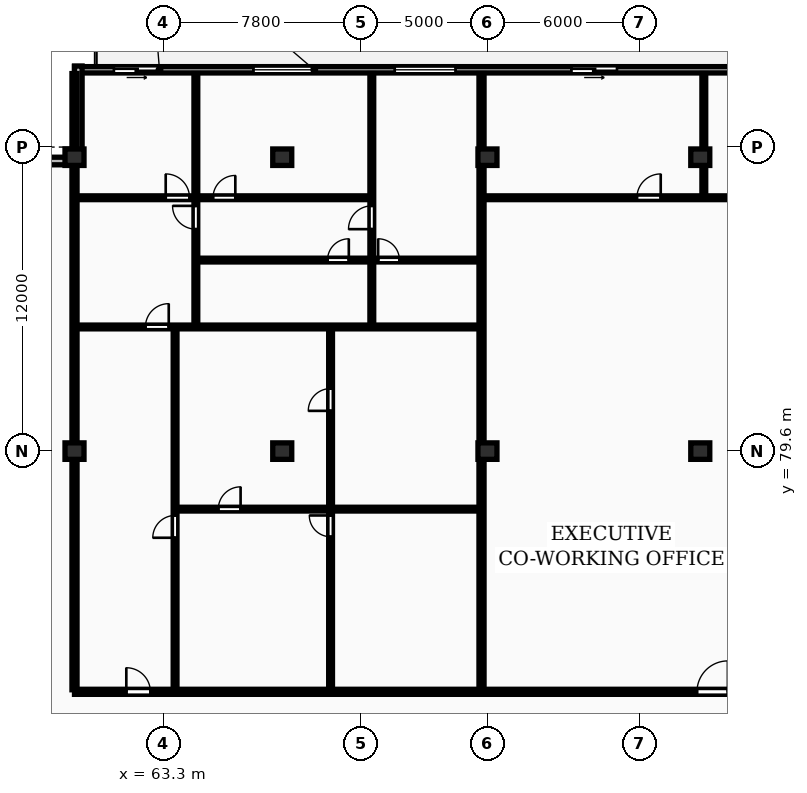
"""IFC4 building model, lengths in metres.
Left out: names, types, materials, properties, quantities, classifications, styles, units other than length and angle.
Written with IfcOpenShell. Run it as: python <this file> out.ifc"""

import sys

from ifc_helpers import new_model, si_unit, direction, frame, frame_2d, origin, origin_2d, place, context, subcontext, project, spatial, rectangle, extrude, element, fill, save


model = new_model("IFC4")
c1 = context("Model", 3, precision=1e-05, world=origin(), true_north=direction((0.0, 1.0)))
c2 = subcontext(c1, "Body", "Model", "MODEL_VIEW")
j1 = project(units=[si_unit("LENGTHUNIT", "METRE"), si_unit("PLANEANGLEUNIT", "RADIAN")], contexts=[c1])
p1 = place(None, origin())
s1 = spatial("IfcSite", under=j1, at=p1, CompositionType="ELEMENT")
p2 = place(p1, origin())
s2 = spatial("IfcBuilding", under=s1, at=p2, CompositionType="ELEMENT")
p3 = place(p2, frame((0.0, 0.0, 242.45)))
s3 = spatial("IfcBuildingStorey", under=s2, at=p3, CompositionType="ELEMENT", Elevation=242.45)
for number, where, z_axis, x_axis in (
    (1, (59.8, 79.6, 0.0), (0.0, 0.0, 1.0), (1.0, 0.0, 0.0)),
    (2, (59.8, 91.2, 0.0), (0.0, 0.0, 1.0), (1.0, 0.0, 0.0)),
    (3, (68.0, 79.6, 0.0), (0.0, 0.0, 1.0), (1.0, 0.0, 0.0)),
    (4, (68.0, 91.2, 0.0), (0.0, 0.0, 1.0), (1.0, 0.0, 0.0)),
    (5, (76.1, 79.6, 0.0), (0.0, 0.0, 1.0), (1.0, 0.0, 0.0)),
    (6, (76.1, 91.2, 0.0), (0.0, 0.0, 1.0), (1.0, 0.0, 0.0)),
    (7, (84.5, 79.6, 0.0), (0.0, 0.0, 1.0), (1.0, 0.0, 0.0)),
    (8, (84.5, 91.2, 0.0), (0.0, 0.0, 1.0), (1.0, 0.0, 0.0)),
):
    element("IfcColumn", number, at=place(p3, frame(where, z_axis=z_axis, x_axis=x_axis)), inside=s3, PredefinedType="COLUMN", context=c2, shape_type="SweptSolid", body=[
        extrude(rectangle(XDim=0.75, YDim=0.65, at=origin_2d()), origin(), (0.0, 0.0, 1.0), 3.45),
    ])
p4 = place(p3, frame((128.4, 94.65, 0.0), z_axis=(0.0, 0.0, 1.0), x_axis=(-1.0, 0.0, 0.0)))
e9 = element("IfcWall", 9, at=p4, inside=s3, PredefinedType="STANDARD", context=c2, shape_type="SweptSolid", body=[
    extrude(rectangle(XDim=68.6, YDim=0.25, at=frame_2d((34.3, 0.0))), origin(), (0.0, 0.0, 1.0), 3.17),
])
p5 = place(p4, frame((59.137, 0.0, 0.85)))
e10 = element("IfcOpeningElement", 10, at=p5, cuts=e9, PredefinedType="OPENING", context=c2, shape_type="SweptSolid", body=[
    extrude(rectangle(XDim=2.4, YDim=1.9, at=frame_2d((1.2, 0.95))), frame((0.0, 0.135, 0.0), z_axis=(0.0, -1.0, 0.0), x_axis=(1.0, 0.0, 0.0)), (0.0, 0.0, 1.0), 0.27),
])
p6 = place(p4, frame((65.245, 0.0, 0.0)))
e11 = element("IfcOpeningElement", 11, at=p6, cuts=e9, PredefinedType="OPENING", context=c2, shape_type="SweptSolid", body=[
    extrude(rectangle(XDim=1.8, YDim=2.2, at=frame_2d((0.9, 1.1))), frame((0.0, 0.135, 0.0), z_axis=(0.0, -1.0, 0.0), x_axis=(1.0, 0.0, 0.0)), (0.0, 0.0, 1.0), 0.27),
])
p7 = place(p4, frame((53.56, 0.0, 0.85)))
e12 = element("IfcOpeningElement", 12, at=p7, cuts=e9, PredefinedType="OPENING", context=c2, shape_type="SweptSolid", body=[
    extrude(rectangle(XDim=2.4, YDim=1.9, at=frame_2d((1.2, 0.95))), frame((0.0, 0.135, 0.0), z_axis=(0.0, -1.0, 0.0), x_axis=(1.0, 0.0, 0.0)), (0.0, 0.0, 1.0), 0.27),
])
p8 = place(p4, frame((47.188, 0.0, 0.0)))
e13 = element("IfcOpeningElement", 13, at=p8, cuts=e9, PredefinedType="OPENING", context=c2, shape_type="SweptSolid", body=[
    extrude(rectangle(XDim=1.8, YDim=2.2, at=frame_2d((0.9, 1.1))), frame((0.0, 0.135, 0.0), z_axis=(0.0, -1.0, 0.0), x_axis=(1.0, 0.0, 0.0)), (0.0, 0.0, 1.0), 0.27),
])
p9 = place(p4, frame((36.928, 0.0, 0.85)))
e14 = element("IfcOpeningElement", 14, at=p9, cuts=e9, PredefinedType="OPENING", context=c2, shape_type="SweptSolid", body=[
    extrude(rectangle(XDim=2.4, YDim=1.9, at=frame_2d((1.2, 0.95))), frame((0.0, 0.135, 0.0), z_axis=(0.0, -1.0, 0.0), x_axis=(1.0, 0.0, 0.0)), (0.0, 0.0, 1.0), 0.27),
])
p10 = place(p4, frame((27.64, 0.0, 0.0)))
e15 = element("IfcOpeningElement", 15, at=p10, cuts=e9, PredefinedType="OPENING", context=c2, shape_type="SweptSolid", body=[
    extrude(rectangle(XDim=1.8, YDim=2.2, at=frame_2d((0.9, 1.1))), frame((0.0, 0.135, 0.0), z_axis=(0.0, -1.0, 0.0), x_axis=(1.0, 0.0, 0.0)), (0.0, 0.0, 1.0), 0.27),
])
p11 = place(p4, frame((18.487, 0.0, 0.85)))
e16 = element("IfcOpeningElement", 16, at=p11, cuts=e9, PredefinedType="OPENING", context=c2, shape_type="SweptSolid", body=[
    extrude(rectangle(XDim=2.4, YDim=1.9, at=frame_2d((1.2, 0.95))), frame((0.0, 0.135, 0.0), z_axis=(0.0, -1.0, 0.0), x_axis=(1.0, 0.0, 0.0)), (0.0, 0.0, 1.0), 0.27),
])
p12 = place(p4, frame((7.966, 0.0, 0.0)))
e17 = element("IfcOpeningElement", 17, at=p12, cuts=e9, PredefinedType="OPENING", context=c2, shape_type="SweptSolid", body=[
    extrude(rectangle(XDim=1.8, YDim=2.2, at=frame_2d((0.9, 1.1))), frame((0.0, 0.135, 0.0), z_axis=(0.0, -1.0, 0.0), x_axis=(1.0, 0.0, 0.0)), (0.0, 0.0, 1.0), 0.27),
])
p13 = place(p4, frame((0.87, 0.0, 0.85)))
e18 = element("IfcOpeningElement", 18, at=p13, cuts=e9, PredefinedType="OPENING", context=c2, shape_type="SweptSolid", body=[
    extrude(rectangle(XDim=1.8, YDim=1.8, at=frame_2d((0.9, 0.9))), frame((0.0, 0.135, 0.0), z_axis=(0.0, -1.0, 0.0), x_axis=(1.0, 0.0, 0.0)), (0.0, 0.0, 1.0), 0.27),
])
for number, where, z_axis, x_axis in (
    (19, (59.95, 94.8, 0.0), (0.0, 0.0, 1.0), (0.0, -1.0, 0.0)),
    (20, (59.8, 91.05, 0.0), (0.0, 0.0, 1.0), (-1.0, 0.0, 0.0)),
):
    element("IfcWall", number, at=place(p3, frame(where, z_axis=z_axis, x_axis=x_axis)), inside=s3, PredefinedType="STANDARD", context=c2, shape_type="SweptSolid", body=[
        extrude(rectangle(XDim=3.6, YDim=0.3, at=frame_2d((1.8, 0.0))), origin(), (0.0, 0.0, 1.0), 3.17),
    ])
for number, where, z_axis, x_axis in (
    (21, (59.8, 70.18, 0.0), (0.0, 0.0, 1.0), (0.0, 1.0, 0.0)),
    (22, (75.865, 70.18, 0.0), (0.0, 0.0, 1.0), (0.0, 1.0, 0.0)),
):
    element("IfcWall", number, at=place(p3, frame(where, z_axis=z_axis, x_axis=x_axis)), inside=s3, PredefinedType="PARTITIONING", context=c2, shape_type="SweptSolid", body=[
        extrude(rectangle(XDim=24.32, YDim=0.2, at=frame_2d((12.16, 0.0))), origin(), (0.0, 0.0, 1.0), 2.477),
    ])
p14 = place(p3, frame((69.908, 70.16, 0.0), z_axis=(0.0, 0.0, 1.0), x_axis=(0.0, 1.0, 0.0)))
e23 = element("IfcWall", 23, at=p14, inside=s3, PredefinedType="PARTITIONING", context=c2, shape_type="SweptSolid", body=[
    extrude(rectangle(XDim=14.3, YDim=0.15, at=frame_2d((7.15, 0.0))), origin(), (0.0, 0.0, 1.0), 3.17),
])
p15 = place(p14, frame((6.06, 0.0, 0.0)))
e24 = element("IfcOpeningElement", 24, at=p15, cuts=e23, PredefinedType="OPENING", context=c2, shape_type="SweptSolid", body=[
    extrude(rectangle(XDim=0.84, YDim=2.04, at=frame_2d((0.42, 1.02))), frame((0.0, 0.085, 0.0), z_axis=(0.0, -1.0, 0.0), x_axis=(1.0, 0.0, 0.0)), (0.0, 0.0, 1.0), 0.17),
])
p16 = place(p14, frame((11.029, 0.0, 0.0)))
e25 = element("IfcOpeningElement", 25, at=p16, cuts=e23, PredefinedType="OPENING", context=c2, shape_type="SweptSolid", body=[
    extrude(rectangle(XDim=0.88, YDim=2.06, at=frame_2d((0.44, 1.03))), frame((0.0, 0.085, 0.0), z_axis=(0.0, -1.0, 0.0), x_axis=(1.0, 0.0, 0.0)), (0.0, 0.0, 1.0), 0.17),
])
p17 = place(p3, frame((63.83, 77.31, 0.0), z_axis=(0.0, 0.0, 1.0), x_axis=(1.0, 0.0, 0.0)))
e26 = element("IfcWall", 26, at=p17, inside=s3, PredefinedType="PARTITIONING", context=c2, shape_type="SweptSolid", body=[
    extrude(rectangle(XDim=11.955, YDim=0.15, at=frame_2d((5.978, 0.0))), origin(), (0.0, 0.0, 1.0), 3.17),
])
p18 = place(p17, frame((1.646, 0.0, 0.0)))
e27 = element("IfcOpeningElement", 27, at=p18, cuts=e26, PredefinedType="OPENING", context=c2, shape_type="SweptSolid", body=[
    extrude(rectangle(XDim=0.88, YDim=2.06, at=frame_2d((0.44, 1.03))), frame((0.0, 0.085, 0.0), z_axis=(0.0, -1.0, 0.0), x_axis=(1.0, 0.0, 0.0)), (0.0, 0.0, 1.0), 0.17),
])
p19 = place(p3, frame((63.77, 70.16, 0.0), z_axis=(0.0, 0.0, 1.0), x_axis=(0.0, 1.0, 0.0)))
e28 = element("IfcWall", 28, at=p19, inside=s3, PredefinedType="PARTITIONING", context=c2, shape_type="SweptSolid", body=[
    extrude(rectangle(XDim=14.3, YDim=0.15, at=frame_2d((7.15, 0.0))), origin(), (0.0, 0.0, 1.0), 3.17),
])
p20 = place(p19, frame((6.02, 0.0, 0.0)))
e29 = element("IfcOpeningElement", 29, at=p20, cuts=e28, PredefinedType="OPENING", context=c2, shape_type="SweptSolid", body=[
    extrude(rectangle(XDim=0.88, YDim=2.06, at=frame_2d((0.44, 1.03))), frame((0.0, 0.085, 0.0), z_axis=(0.0, -1.0, 0.0), x_axis=(1.0, 0.0, 0.0)), (0.0, 0.0, 1.0), 0.17),
])
p21 = place(p3, frame((64.59, 84.54, 0.0), z_axis=(0.0, 0.0, 1.0), x_axis=(0.0, 1.0, 0.0)))
e30 = element("IfcWall", 30, at=p21, inside=s3, PredefinedType="PARTITIONING", context=c2, shape_type="SweptSolid", body=[
    extrude(rectangle(XDim=9.96, YDim=0.15, at=frame_2d((4.98, 0.0))), origin(), (0.0, 0.0, 1.0), 3.17),
])
p22 = place(p21, frame((3.82, 0.0, 0.0)))
e31 = element("IfcOpeningElement", 31, at=p22, cuts=e30, PredefinedType="OPENING", context=c2, shape_type="SweptSolid", body=[
    extrude(rectangle(XDim=0.92, YDim=2.08, at=frame_2d((0.46, 1.04))), frame((0.0, 0.085, 0.0), z_axis=(0.0, -1.0, 0.0), x_axis=(1.0, 0.0, 0.0)), (0.0, 0.0, 1.0), 0.17),
])
p23 = place(p3, frame((71.535, 84.54, 0.0), z_axis=(0.0, 0.0, 1.0), x_axis=(0.0, 1.0, 0.0)))
e32 = element("IfcWall", 32, at=p23, inside=s3, PredefinedType="PARTITIONING", context=c2, shape_type="SweptSolid", body=[
    extrude(rectangle(XDim=2.58, YDim=0.15, at=frame_2d((1.29, 0.0))), origin(), (0.0, 0.0, 1.0), 3.17),
])
p24 = place(p3, frame((71.535, 87.16, 0.0), z_axis=(0.0, 0.0, 1.0), x_axis=(0.0, 1.0, 0.0)))
e33 = element("IfcWall", 33, at=p24, inside=s3, PredefinedType="PARTITIONING", context=c2, shape_type="SweptSolid", body=[
    extrude(rectangle(XDim=7.34, YDim=0.15, at=frame_2d((3.67, 0.0))), origin(), (0.0, 0.0, 1.0), 3.17),
])
p25 = place(p24, frame((1.2, 0.0, 0.0)))
e34 = element("IfcOpeningElement", 34, at=p25, cuts=e33, PredefinedType="OPENING", context=c2, shape_type="SweptSolid", body=[
    extrude(rectangle(XDim=0.92, YDim=2.08, at=frame_2d((0.46, 1.04))), frame((0.0, 0.085, 0.0), z_axis=(0.0, -1.0, 0.0), x_axis=(1.0, 0.0, 0.0)), (0.0, 0.0, 1.0), 0.17),
])
p26 = place(p3, frame((64.63, 87.14, 0.0), z_axis=(0.0, 0.0, 1.0), x_axis=(1.0, 0.0, 0.0)))
e35 = element("IfcWall", 35, at=p26, inside=s3, PredefinedType="PARTITIONING", context=c2, shape_type="SweptSolid", body=[
    extrude(rectangle(XDim=11.155, YDim=0.15, at=frame_2d((5.578, 0.0))), origin(), (0.0, 0.0, 1.0), 3.17),
])
p27 = place(p26, frame((5.158, 0.0, 0.0)))
e36 = element("IfcOpeningElement", 36, at=p27, cuts=e35, PredefinedType="OPENING", context=c2, shape_type="SweptSolid", body=[
    extrude(rectangle(XDim=0.84, YDim=2.04, at=frame_2d((0.42, 1.02))), frame((0.0, 0.085, 0.0), z_axis=(0.0, -1.0, 0.0), x_axis=(1.0, 0.0, 0.0)), (0.0, 0.0, 1.0), 0.17),
])
p28 = place(p26, frame((7.155, 0.0, 0.0)))
e37 = element("IfcOpeningElement", 37, at=p28, cuts=e35, PredefinedType="OPENING", context=c2, shape_type="SweptSolid", body=[
    extrude(rectangle(XDim=0.84, YDim=2.04, at=frame_2d((0.42, 1.02))), frame((0.0, 0.085, 0.0), z_axis=(0.0, -1.0, 0.0), x_axis=(1.0, 0.0, 0.0)), (0.0, 0.0, 1.0), 0.17),
])
p29 = place(p3, frame((59.88, 84.5, 0.0), z_axis=(0.0, 0.0, 1.0), x_axis=(1.0, 0.0, 0.0)))
e38 = element("IfcWall", 38, at=p29, inside=s3, PredefinedType="PARTITIONING", context=c2, shape_type="SweptSolid", body=[
    extrude(rectangle(XDim=15.905, YDim=0.15, at=frame_2d((7.953, 0.0))), origin(), (0.0, 0.0, 1.0), 3.17),
])
p30 = place(p29, frame((2.72, 0.0, 0.0)))
e39 = element("IfcOpeningElement", 39, at=p30, cuts=e38, PredefinedType="OPENING", context=c2, shape_type="SweptSolid", body=[
    extrude(rectangle(XDim=0.92, YDim=2.08, at=frame_2d((0.46, 1.04))), frame((0.0, 0.085, 0.0), z_axis=(0.0, -1.0, 0.0), x_axis=(1.0, 0.0, 0.0)), (0.0, 0.0, 1.0), 0.17),
])
p31 = place(p3, frame((59.88, 89.6, 0.0), z_axis=(0.0, 0.0, 1.0), x_axis=(1.0, 0.0, 0.0)))
e40 = element("IfcWall", 40, at=p31, inside=s3, PredefinedType="PARTITIONING", context=c2, shape_type="SweptSolid", body=[
    extrude(rectangle(XDim=11.655, YDim=0.15, at=frame_2d((5.828, 0.0))), origin(), (0.0, 0.0, 1.0), 3.17),
])
p32 = place(p31, frame((3.52, 0.0, 0.0)))
e41 = element("IfcOpeningElement", 41, at=p32, cuts=e40, PredefinedType="OPENING", context=c2, shape_type="SweptSolid", body=[
    extrude(rectangle(XDim=0.94, YDim=2.1, at=frame_2d((0.47, 1.05))), frame((0.0, 0.085, 0.0), z_axis=(0.0, -1.0, 0.0), x_axis=(1.0, 0.0, 0.0)), (0.0, 0.0, 1.0), 0.17),
])
p33 = place(p31, frame((5.387, 0.0, 0.0)))
e42 = element("IfcOpeningElement", 42, at=p33, cuts=e40, PredefinedType="OPENING", context=c2, shape_type="SweptSolid", body=[
    extrude(rectangle(XDim=0.88, YDim=2.06, at=frame_2d((0.44, 1.03))), frame((0.0, 0.085, 0.0), z_axis=(0.0, -1.0, 0.0), x_axis=(1.0, 0.0, 0.0)), (0.0, 0.0, 1.0), 0.17),
])
p34 = place(p3, frame((84.64, 89.68, 0.0), z_axis=(0.0, 0.0, 1.0), x_axis=(0.0, 1.0, 0.0)))
e43 = element("IfcWall", 43, at=p34, inside=s3, PredefinedType="PARTITIONING", context=c2, shape_type="SweptSolid", body=[
    extrude(rectangle(XDim=4.82, YDim=0.15, at=frame_2d((2.41, 0.0))), origin(), (0.0, 0.0, 1.0), 2.477),
])
p35 = place(p3, frame((75.945, 89.6, 0.0), z_axis=(0.0, 0.0, 1.0), x_axis=(1.0, 0.0, 0.0)))
e44 = element("IfcWall", 44, at=p35, inside=s3, PredefinedType="PARTITIONING", context=c2, shape_type="SweptSolid", body=[
    extrude(rectangle(XDim=19.999, YDim=0.15, at=frame_2d((10.0, 0.0))), origin(), (0.0, 0.0, 1.0), 3.17),
])
p36 = place(p35, frame((6.054, 0.0, 0.0)))
e45 = element("IfcOpeningElement", 45, at=p36, cuts=e44, PredefinedType="OPENING", context=c2, shape_type="SweptSolid", body=[
    extrude(rectangle(XDim=0.94, YDim=2.1, at=frame_2d((0.47, 1.05))), frame((0.0, 0.085, 0.0), z_axis=(0.0, -1.0, 0.0), x_axis=(1.0, 0.0, 0.0)), (0.0, 0.0, 1.0), 0.17),
])
p37 = place(p35, frame((10.146, 0.0, 0.0)))
e46 = element("IfcOpeningElement", 46, at=p37, cuts=e44, PredefinedType="OPENING", context=c2, shape_type="SweptSolid", body=[
    extrude(rectangle(XDim=0.94, YDim=2.1, at=frame_2d((0.47, 1.05))), frame((0.0, 0.085, 0.0), z_axis=(0.0, -1.0, 0.0), x_axis=(1.0, 0.0, 0.0)), (0.0, 0.0, 1.0), 0.17),
])
p38 = place(p3, frame((59.8, 70.1, 0.0), z_axis=(0.0, 0.0, 1.0), x_axis=(1.0, 0.0, 0.0)))
e47 = element("IfcWall", 47, at=p38, inside=s3, PredefinedType="PARTITIONING", context=c2, shape_type="SweptSolid", body=[
    extrude(rectangle(XDim=68.6, YDim=0.2, at=frame_2d((34.3, 0.0))), origin(), (0.0, 0.0, 1.0), 3.17),
])
p39 = place(p38, frame((2.045, 0.0, 0.0)))
e48 = element("IfcOpeningElement", 48, at=p39, cuts=e47, PredefinedType="OPENING", context=c2, shape_type="SweptSolid", body=[
    extrude(rectangle(XDim=0.95, YDim=2.15, at=frame_2d((0.475, 1.075))), frame((0.0, 0.11, 0.0), z_axis=(0.0, -1.0, 0.0), x_axis=(1.0, 0.0, 0.0)), (0.0, 0.0, 1.0), 0.22),
])
p40 = place(p38, frame((24.57, 0.0, 0.0)))
e49 = element("IfcOpeningElement", 49, at=p40, cuts=e47, PredefinedType="OPENING", context=c2, shape_type="SweptSolid", body=[
    extrude(rectangle(XDim=1.22, YDim=2.18, at=frame_2d((0.61, 1.09))), frame((0.0, 0.11, 0.0), z_axis=(0.0, -1.0, 0.0), x_axis=(1.0, 0.0, 0.0)), (0.0, 0.0, 1.0), 0.22),
])
p41 = place(p38, frame((43.507, 0.0, 0.0)))
e50 = element("IfcOpeningElement", 50, at=p41, cuts=e47, PredefinedType="OPENING", context=c2, shape_type="SweptSolid", body=[
    extrude(rectangle(XDim=1.22, YDim=2.18, at=frame_2d((0.61, 1.09))), frame((0.0, 0.11, 0.0), z_axis=(0.0, -1.0, 0.0), x_axis=(1.0, 0.0, 0.0)), (0.0, 0.0, 1.0), 0.22),
])
p42 = place(p38, frame((56.214, 0.0, 0.0)))
e51 = element("IfcOpeningElement", 51, at=p42, cuts=e47, PredefinedType="OPENING", context=c2, shape_type="SweptSolid", body=[
    extrude(rectangle(XDim=0.95, YDim=2.15, at=frame_2d((0.475, 1.075))), frame((0.0, 0.11, 0.0), z_axis=(0.0, -1.0, 0.0), x_axis=(1.0, 0.0, 0.0)), (0.0, 0.0, 1.0), 0.22),
])
p43 = place(p5, origin())
e52 = element("IfcWindow", 52, at=p43, inside=s3, PartitioningType="DOUBLE_PANEL_VERTICAL", PredefinedType="WINDOW", context=c2, shape_type="SweptSolid", body=[
    extrude(rectangle(XDim=2.4, YDim=1.9, at=frame_2d((1.2, 0.95))), frame((0.0, 0.03, 0.0), z_axis=(0.0, -1.0, 0.0), x_axis=(1.0, 0.0, 0.0)), (0.0, 0.0, 1.0), 0.06),
])
fill(e10, e52)
p44 = place(p6, origin())
e53 = element("IfcDoor", 53, at=p44, inside=s3, OperationType="SLIDING_TO_LEFT", PredefinedType="DOOR", context=c2, shape_type="SweptSolid", body=[
    extrude(rectangle(XDim=1.8, YDim=2.2, at=frame_2d((0.9, 1.1))), frame((0.0, 0.025, 0.0), z_axis=(0.0, -1.0, 0.0), x_axis=(1.0, 0.0, 0.0)), (0.0, 0.0, 1.0), 0.05),
])
fill(e11, e53)
p45 = place(p7, origin())
e54 = element("IfcWindow", 54, at=p45, inside=s3, PartitioningType="DOUBLE_PANEL_VERTICAL", PredefinedType="WINDOW", context=c2, shape_type="SweptSolid", body=[
    extrude(rectangle(XDim=2.4, YDim=1.9, at=frame_2d((1.2, 0.95))), frame((0.0, 0.03, 0.0), z_axis=(0.0, -1.0, 0.0), x_axis=(1.0, 0.0, 0.0)), (0.0, 0.0, 1.0), 0.06),
])
fill(e12, e54)
p46 = place(p8, origin())
e55 = element("IfcDoor", 55, at=p46, inside=s3, OperationType="SLIDING_TO_LEFT", PredefinedType="DOOR", context=c2, shape_type="SweptSolid", body=[
    extrude(rectangle(XDim=1.8, YDim=2.2, at=frame_2d((0.9, 1.1))), frame((0.0, 0.025, 0.0), z_axis=(0.0, -1.0, 0.0), x_axis=(1.0, 0.0, 0.0)), (0.0, 0.0, 1.0), 0.05),
])
fill(e13, e55)
p47 = place(p15, origin())
e56 = element("IfcDoor", 56, at=p47, inside=s3, OperationType="SINGLE_SWING_RIGHT", PredefinedType="DOOR", context=c2, shape_type="SweptSolid", body=[
    extrude(rectangle(XDim=0.84, YDim=2.04, at=frame_2d((0.42, 1.02))), frame((0.0, 0.025, 0.0), z_axis=(0.0, -1.0, 0.0), x_axis=(1.0, 0.0, 0.0)), (0.0, 0.0, 1.0), 0.05),
])
fill(e24, e56)
p48 = place(p16, origin())
e57 = element("IfcDoor", 57, at=p48, inside=s3, OperationType="SINGLE_SWING_LEFT", PredefinedType="DOOR", context=c2, shape_type="SweptSolid", body=[
    extrude(rectangle(XDim=0.88, YDim=2.06, at=frame_2d((0.44, 1.03))), frame((0.0, 0.025, 0.0), z_axis=(0.0, -1.0, 0.0), x_axis=(1.0, 0.0, 0.0)), (0.0, 0.0, 1.0), 0.05),
])
fill(e25, e57)
p49 = place(p18, origin())
e58 = element("IfcDoor", 58, at=p49, inside=s3, OperationType="SINGLE_SWING_RIGHT", PredefinedType="DOOR", context=c2, shape_type="SweptSolid", body=[
    extrude(rectangle(XDim=0.88, YDim=2.06, at=frame_2d((0.44, 1.03))), frame((0.0, 0.025, 0.0), z_axis=(0.0, -1.0, 0.0), x_axis=(1.0, 0.0, 0.0)), (0.0, 0.0, 1.0), 0.05),
])
fill(e27, e58)
p50 = place(p20, origin())
e59 = element("IfcDoor", 59, at=p50, inside=s3, OperationType="SINGLE_SWING_LEFT", PredefinedType="DOOR", context=c2, shape_type="SweptSolid", body=[
    extrude(rectangle(XDim=0.88, YDim=2.06, at=frame_2d((0.44, 1.03))), frame((0.0, 0.025, 0.0), z_axis=(0.0, -1.0, 0.0), x_axis=(1.0, 0.0, 0.0)), (0.0, 0.0, 1.0), 0.05),
])
fill(e29, e59)
p51 = place(p22, origin())
e60 = element("IfcDoor", 60, at=p51, inside=s3, OperationType="SINGLE_SWING_RIGHT", PredefinedType="DOOR", context=c2, shape_type="SweptSolid", body=[
    extrude(rectangle(XDim=0.92, YDim=2.08, at=frame_2d((0.46, 1.04))), frame((0.0, 0.025, 0.0), z_axis=(0.0, -1.0, 0.0), x_axis=(1.0, 0.0, 0.0)), (0.0, 0.0, 1.0), 0.05),
])
fill(e31, e60)
p52 = place(p25, origin())
e61 = element("IfcDoor", 61, at=p52, inside=s3, OperationType="SINGLE_SWING_LEFT", PredefinedType="DOOR", context=c2, shape_type="SweptSolid", body=[
    extrude(rectangle(XDim=0.92, YDim=2.08, at=frame_2d((0.46, 1.04))), frame((0.0, 0.025, 0.0), z_axis=(0.0, -1.0, 0.0), x_axis=(1.0, 0.0, 0.0)), (0.0, 0.0, 1.0), 0.05),
])
fill(e34, e61)
p53 = place(p27, origin())
e62 = element("IfcDoor", 62, at=p53, inside=s3, OperationType="SINGLE_SWING_RIGHT", PredefinedType="DOOR", context=c2, shape_type="SweptSolid", body=[
    extrude(rectangle(XDim=0.84, YDim=2.04, at=frame_2d((0.42, 1.02))), frame((0.0, 0.025, 0.0), z_axis=(0.0, -1.0, 0.0), x_axis=(1.0, 0.0, 0.0)), (0.0, 0.0, 1.0), 0.05),
])
fill(e36, e62)
p54 = place(p28, origin())
e63 = element("IfcDoor", 63, at=p54, inside=s3, OperationType="SINGLE_SWING_LEFT", PredefinedType="DOOR", context=c2, shape_type="SweptSolid", body=[
    extrude(rectangle(XDim=0.84, YDim=2.04, at=frame_2d((0.42, 1.02))), frame((0.0, 0.025, 0.0), z_axis=(0.0, -1.0, 0.0), x_axis=(1.0, 0.0, 0.0)), (0.0, 0.0, 1.0), 0.05),
])
fill(e37, e63)
p55 = place(p30, origin())
e64 = element("IfcDoor", 64, at=p55, inside=s3, OperationType="SINGLE_SWING_RIGHT", PredefinedType="DOOR", context=c2, shape_type="SweptSolid", body=[
    extrude(rectangle(XDim=0.92, YDim=2.08, at=frame_2d((0.46, 1.04))), frame((0.0, 0.025, 0.0), z_axis=(0.0, -1.0, 0.0), x_axis=(1.0, 0.0, 0.0)), (0.0, 0.0, 1.0), 0.05),
])
fill(e39, e64)
p56 = place(p32, origin())
e65 = element("IfcDoor", 65, at=p56, inside=s3, OperationType="SINGLE_SWING_LEFT", PredefinedType="DOOR", context=c2, shape_type="SweptSolid", body=[
    extrude(rectangle(XDim=0.94, YDim=2.1, at=frame_2d((0.47, 1.05))), frame((0.0, 0.025, 0.0), z_axis=(0.0, -1.0, 0.0), x_axis=(1.0, 0.0, 0.0)), (0.0, 0.0, 1.0), 0.05),
])
fill(e41, e65)
p57 = place(p33, origin())
e66 = element("IfcDoor", 66, at=p57, inside=s3, OperationType="SINGLE_SWING_RIGHT", PredefinedType="DOOR", context=c2, shape_type="SweptSolid", body=[
    extrude(rectangle(XDim=0.88, YDim=2.06, at=frame_2d((0.44, 1.03))), frame((0.0, 0.025, 0.0), z_axis=(0.0, -1.0, 0.0), x_axis=(1.0, 0.0, 0.0)), (0.0, 0.0, 1.0), 0.05),
])
fill(e42, e66)
p58 = place(p36, origin())
e67 = element("IfcDoor", 67, at=p58, inside=s3, OperationType="SINGLE_SWING_RIGHT", PredefinedType="DOOR", context=c2, shape_type="SweptSolid", body=[
    extrude(rectangle(XDim=0.94, YDim=2.1, at=frame_2d((0.47, 1.05))), frame((0.0, 0.025, 0.0), z_axis=(0.0, -1.0, 0.0), x_axis=(1.0, 0.0, 0.0)), (0.0, 0.0, 1.0), 0.05),
])
fill(e45, e67)
p59 = place(p39, origin())
e68 = element("IfcDoor", 68, at=p59, inside=s3, OperationType="SINGLE_SWING_LEFT", PredefinedType="DOOR", context=c2, shape_type="SweptSolid", body=[
    extrude(rectangle(XDim=0.95, YDim=2.15, at=frame_2d((0.475, 1.075))), frame((0.0, 0.025, 0.0), z_axis=(0.0, -1.0, 0.0), x_axis=(1.0, 0.0, 0.0)), (0.0, 0.0, 1.0), 0.05),
])
fill(e48, e68)
p60 = place(p40, origin())
e69 = element("IfcDoor", 69, at=p60, inside=s3, OperationType="SINGLE_SWING_RIGHT", PredefinedType="DOOR", context=c2, shape_type="SweptSolid", body=[
    extrude(rectangle(XDim=1.22, YDim=2.18, at=frame_2d((0.61, 1.09))), frame((0.0, 0.025, 0.0), z_axis=(0.0, -1.0, 0.0), x_axis=(1.0, 0.0, 0.0)), (0.0, 0.0, 1.0), 0.05),
])
fill(e49, e69)
save(model, sys.argv[1])
